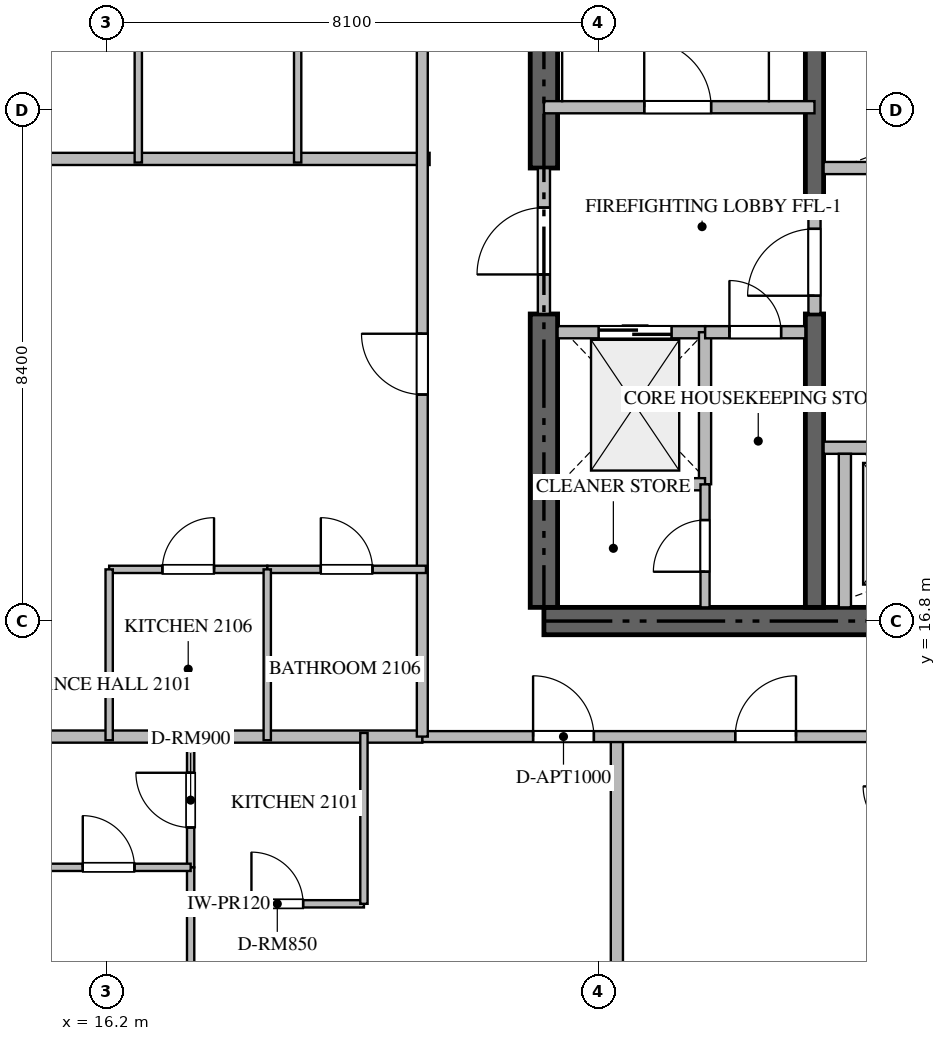
"""IFC4 building model, lengths in metres.
Left out: names, types, materials, properties, quantities, classifications, styles, units other than length and angle.
Written with IfcOpenShell. Run it as: python <this file> out.ifc"""

import sys

from ifc_helpers import new_model, si_unit, direction, frame, frame_2d, origin, place, context, subcontext, project, spatial, rectangle, extrude, source, transform, mapped, element, fill, save


model = new_model("IFC4")
c1 = context("Model", 3, precision=1e-05, world=origin(), true_north=direction((0.0, 1.0)))
c2 = subcontext(c1, "Body", "Model", "MODEL_VIEW")
j1 = project(units=[si_unit("LENGTHUNIT", "METRE"), si_unit("PLANEANGLEUNIT", "RADIAN")], contexts=[c1])
p1 = place(None, origin())
s1 = spatial("IfcSite", under=j1, at=p1, CompositionType="ELEMENT")
p2 = place(p1, origin())
s2 = spatial("IfcBuilding", under=s1, at=p2, CompositionType="ELEMENT")
p3 = place(p2, frame((0.0, 0.0, 86.7)))
s3 = spatial("IfcBuildingStorey", under=s2, at=p3, CompositionType="ELEMENT", Elevation=86.7)
p4 = place(p3, frame((23.4, 16.8, -0.26), z_axis=(0.0, 0.0, 1.0), x_axis=(1.0, 0.0, 0.0)))
e1 = element("IfcWall", 1, at=p4, inside=s3, PredefinedType="SHEAR", context=c2, shape_type="SweptSolid", body=[
    extrude(rectangle(XDim=18.0, YDim=0.45, at=frame_2d((9.0, 0.0))), origin(), (0.0, 0.0, 1.0), 3.748),
])
p5 = place(p3, frame((23.4, 17.025, -0.26), z_axis=(0.0, 0.0, 1.0), x_axis=(0.0, 1.0, 0.0)))
e2 = element("IfcWall", 2, at=p5, inside=s3, PredefinedType="SHEAR", context=c2, shape_type="SweptSolid", body=[
    extrude(rectangle(XDim=4.825, YDim=0.45, at=frame_2d((2.413, 0.0))), origin(), (0.0, 0.0, 1.0), 3.748),
])
p6 = place(p3, frame((23.4, 24.25, -0.26), z_axis=(0.0, 0.0, 1.0), x_axis=(0.0, 1.0, 0.0)))
e3 = element("IfcWall", 3, at=p6, inside=s3, PredefinedType="SHEAR", context=c2, shape_type="SweptSolid", body=[
    extrude(rectangle(XDim=9.125, YDim=0.45, at=frame_2d((4.562, 0.0))), origin(), (0.0, 0.0, 1.0), 3.748),
])
p7 = place(p3, frame((27.85, 17.025, -0.26), z_axis=(0.0, 0.0, 1.0), x_axis=(0.0, 1.0, 0.0)))
e4 = element("IfcWall", 4, at=p7, inside=s3, PredefinedType="SHEAR", context=c2, shape_type="SweptSolid", body=[
    extrude(rectangle(XDim=4.825, YDim=0.3, at=frame_2d((2.413, 0.0))), origin(), (0.0, 0.0, 1.0), 3.748),
])
p8 = place(p3, frame((27.85, 23.55, -0.26), z_axis=(0.0, 0.0, 1.0), x_axis=(0.0, 1.0, 0.0)))
e5 = element("IfcWall", 5, at=p8, inside=s3, PredefinedType="SHEAR", context=c2, shape_type="SweptSolid", body=[
    extrude(rectangle(XDim=9.825, YDim=0.3, at=frame_2d((4.913, 0.0))), origin(), (0.0, 0.0, 1.0), 3.748),
])
p9 = place(p3, frame((23.4, 25.25, 0.0), z_axis=(0.0, 0.0, 1.0), x_axis=(1.0, 0.0, 0.0)))
e6 = element("IfcWall", 6, at=p9, inside=s3, PredefinedType="STANDARD", context=c2, shape_type="SweptSolid", body=[
    extrude(rectangle(XDim=4.45, YDim=0.2, at=frame_2d((2.225, 0.0))), origin(), (0.0, 0.0, 1.0), 3.49),
])
p10 = place(p9, frame((1.65, 0.0, 0.0)))
e7 = element("IfcOpeningElement", 7, at=p10, cuts=e6, PredefinedType="OPENING", context=c2, shape_type="SweptSolid", body=[
    extrude(rectangle(XDim=1.1, YDim=2.15, at=frame_2d((0.55, 1.075))), frame((0.0, 0.11, 0.0), z_axis=(0.0, -1.0, 0.0), x_axis=(1.0, 0.0, 0.0)), (0.0, 0.0, 1.0), 0.22),
])
p11 = place(p3, frame((23.625, 21.55, 0.0), z_axis=(0.0, 0.0, 1.0), x_axis=(1.0, 0.0, 0.0)))
e8 = element("IfcWall", 8, at=p11, inside=s3, PredefinedType="STANDARD", context=c2, shape_type="SweptSolid", body=[
    extrude(rectangle(XDim=2.425, YDim=0.2, at=frame_2d((1.212, 0.0))), origin(), (0.0, 0.0, 1.0), 3.49),
])
p12 = place(p11, frame((0.675, 0.0, 0.0)))
e9 = element("IfcOpeningElement", 9, at=p12, cuts=e8, PredefinedType="OPENING", context=c2, shape_type="SweptSolid", body=[
    extrude(rectangle(XDim=1.2, YDim=2.2, at=frame_2d((0.6, 1.1))), frame((0.0, 0.11, 0.0), z_axis=(0.0, -1.0, 0.0), x_axis=(1.0, 0.0, 0.0)), (0.0, 0.0, 1.0), 0.22),
])
p13 = place(p3, frame((28.0, 19.65, 0.0), z_axis=(0.0, 0.0, 1.0), x_axis=(1.0, 0.0, 0.0)))
e10 = element("IfcWall", 10, at=p13, inside=s3, PredefinedType="STANDARD", context=c2, shape_type="SweptSolid", body=[
    extrude(rectangle(XDim=2.65, YDim=0.2, at=frame_2d((1.325, 0.0))), origin(), (0.0, 0.0, 1.0), 3.49),
])
p14 = place(p13, frame((0.9, 0.0, 0.0)))
e11 = element("IfcOpeningElement", 11, at=p14, cuts=e10, PredefinedType="OPENING", context=c2, shape_type="SweptSolid", body=[
    extrude(rectangle(XDim=1.1, YDim=2.2, at=frame_2d((0.55, 1.1))), frame((0.0, 0.11, 0.0), z_axis=(0.0, -1.0, 0.0), x_axis=(1.0, 0.0, 0.0)), (0.0, 0.0, 1.0), 0.22),
])
p15 = place(p3, frame((28.35, 17.025, 0.0), z_axis=(0.0, 0.0, 1.0), x_axis=(0.0, 1.0, 0.0)))
e12 = element("IfcWall", 12, at=p15, inside=s3, PredefinedType="STANDARD", context=c2, shape_type="SweptSolid", body=[
    extrude(rectangle(XDim=2.525, YDim=0.2, at=frame_2d((1.263, 0.0))), origin(), (0.0, 0.0, 1.0), 3.49),
])
p16 = place(p3, frame((28.0, 24.25, 0.0), z_axis=(0.0, 0.0, 1.0), x_axis=(1.0, 0.0, 0.0)))
e13 = element("IfcWall", 13, at=p16, inside=s3, PredefinedType="STANDARD", context=c2, shape_type="SweptSolid", body=[
    extrude(rectangle(XDim=2.425, YDim=0.2, at=frame_2d((1.212, 0.0))), origin(), (0.0, 0.0, 1.0), 3.49),
])
p17 = place(p3, frame((26.05, 19.05, 0.0), z_axis=(0.0, 0.0, 1.0), x_axis=(0.0, 1.0, 0.0)))
e14 = element("IfcWall", 14, at=p17, inside=s3, PredefinedType="STANDARD", context=c2, shape_type="SweptSolid", body=[
    extrude(rectangle(XDim=2.5, YDim=0.2, at=frame_2d((1.25, 0.0))), origin(), (0.0, 0.0, 1.0), 3.49),
])
p18 = place(p3, frame((23.625, 19.05, 0.0), z_axis=(0.0, 0.0, 1.0), x_axis=(1.0, 0.0, 0.0)))
e15 = element("IfcWall", 15, at=p18, inside=s3, PredefinedType="STANDARD", context=c2, shape_type="SweptSolid", body=[
    extrude(rectangle(XDim=2.425, YDim=0.2, at=frame_2d((1.212, 0.0))), origin(), (0.0, 0.0, 1.0), 3.49),
])
p19 = place(p3, frame((26.052, 21.55, 0.0), z_axis=(0.0, 0.0, 1.0), x_axis=(1.0, 0.0, 0.0)))
e16 = element("IfcWall", 16, at=p19, inside=s3, PredefinedType="STANDARD", context=c2, shape_type="SweptSolid", body=[
    extrude(rectangle(XDim=1.648, YDim=0.2, at=frame_2d((0.824, 0.0))), origin(), (0.0, 0.0, 1.0), 3.49),
])
p20 = place(p19, frame((0.399, 0.0, 0.0)))
e17 = element("IfcOpeningElement", 17, at=p20, cuts=e16, PredefinedType="OPENING", context=c2, shape_type="SweptSolid", body=[
    extrude(rectangle(XDim=0.85, YDim=2.1, at=frame_2d((0.425, 1.05))), frame((0.0, 0.11, 0.0), z_axis=(0.0, -1.0, 0.0), x_axis=(1.0, 0.0, 0.0)), (0.0, 0.0, 1.0), 0.22),
])
p21 = place(p3, frame((23.4, 21.852, 0.0), z_axis=(0.0, 0.0, 1.0), x_axis=(0.0, 1.0, 0.0)))
e18 = element("IfcWall", 18, at=p21, inside=s3, PredefinedType="STANDARD", context=c2, shape_type="SweptSolid", body=[
    extrude(rectangle(XDim=2.396, YDim=0.2, at=frame_2d((1.198, 0.0))), origin(), (0.0, 0.0, 1.0), 3.49),
])
p22 = place(p21, frame((0.648, 0.0, 0.0)))
e19 = element("IfcOpeningElement", 19, at=p22, cuts=e18, PredefinedType="OPENING", context=c2, shape_type="SweptSolid", body=[
    extrude(rectangle(XDim=1.1, YDim=2.15, at=frame_2d((0.55, 1.075))), frame((0.0, 0.11, 0.0), z_axis=(0.0, -1.0, 0.0), x_axis=(1.0, 0.0, 0.0)), (0.0, 0.0, 1.0), 0.22),
])
p23 = place(p3, frame((27.85, 21.852, 0.0), z_axis=(0.0, 0.0, 1.0), x_axis=(0.0, 1.0, 0.0)))
e20 = element("IfcWall", 20, at=p23, inside=s3, PredefinedType="STANDARD", context=c2, shape_type="SweptSolid", body=[
    extrude(rectangle(XDim=1.696, YDim=0.2, at=frame_2d((0.848, 0.0))), origin(), (0.0, 0.0, 1.0), 3.49),
])
p24 = place(p23, frame((0.298, 0.0, 0.0)))
e21 = element("IfcOpeningElement", 21, at=p24, cuts=e20, PredefinedType="OPENING", context=c2, shape_type="SweptSolid", body=[
    extrude(rectangle(XDim=1.1, YDim=2.15, at=frame_2d((0.55, 1.075))), frame((0.0, 0.11, 0.0), z_axis=(0.0, -1.0, 0.0), x_axis=(1.0, 0.0, 0.0)), (0.0, 0.0, 1.0), 0.22),
])
p25 = place(p3, frame((26.05, 17.025, 0.0), z_axis=(0.0, 0.0, 1.0), x_axis=(0.0, 1.0, 0.0)))
e22 = element("IfcWall", 22, at=p25, inside=s3, PredefinedType="PARTITIONING", context=c2, shape_type="SweptSolid", body=[
    extrude(rectangle(XDim=2.023, YDim=0.15, at=frame_2d((1.012, 0.0))), origin(), (0.0, 0.0, 1.0), 3.49),
])
p26 = place(p25, frame((0.586, 0.0, 0.0)))
e23 = element("IfcOpeningElement", 23, at=p26, cuts=e22, PredefinedType="OPENING", context=c2, shape_type="SweptSolid", body=[
    extrude(rectangle(XDim=0.85, YDim=2.1, at=frame_2d((0.425, 1.05))), frame((0.0, 0.085, 0.0), z_axis=(0.0, -1.0, 0.0), x_axis=(1.0, 0.0, 0.0)), (0.0, 0.0, 1.0), 0.17),
])
p27 = place(p3, frame((24.6, 0.282, 0.0), z_axis=(0.0, 0.0, 1.0), x_axis=(0.0, 1.0, 0.0)))
e24 = element("IfcWall", 24, at=p27, inside=s3, PredefinedType="PARTITIONING", context=c2, shape_type="SweptSolid", body=[
    extrude(rectangle(XDim=14.618, YDim=0.2, at=frame_2d((7.309, 0.0))), origin(), (0.0, 0.0, 1.0), 3.49),
])
p28 = place(p3, frame((6.082, 24.4, 0.0), z_axis=(0.0, 0.0, 1.0), x_axis=(1.0, 0.0, 0.0)))
e25 = element("IfcWall", 25, at=p28, inside=s3, PredefinedType="PARTITIONING", context=c2, shape_type="SweptSolid", body=[
    extrude(rectangle(XDim=15.438, YDim=0.2, at=frame_2d((7.719, 0.0))), origin(), (0.0, 0.0, 1.0), 3.49),
])
p29 = place(p3, frame((6.082, 14.9, 0.0), z_axis=(0.0, 0.0, 1.0), x_axis=(1.0, 0.0, 0.0)))
e26 = element("IfcWall", 26, at=p29, inside=s3, PredefinedType="PARTITIONING", context=c2, shape_type="SweptSolid", body=[
    extrude(rectangle(XDim=15.318, YDim=0.2, at=frame_2d((7.659, 0.0))), origin(), (0.0, 0.0, 1.0), 3.49),
])
p30 = place(p3, frame((21.402, 14.9, 0.0), z_axis=(0.0, 0.0, 1.0), x_axis=(1.0, 0.0, 0.0)))
e27 = element("IfcWall", 27, at=p30, inside=s3, PredefinedType="PARTITIONING", context=c2, shape_type="SweptSolid", body=[
    extrude(rectangle(XDim=21.996, YDim=0.18, at=frame_2d((10.998, 0.0))), origin(), (0.0, 0.0, 1.0), 3.49),
])
p31 = place(p30, frame((1.82, 0.0, 0.0)))
e28 = element("IfcOpeningElement", 28, at=p31, cuts=e27, PredefinedType="OPENING", context=c2, shape_type="SweptSolid", body=[
    extrude(rectangle(XDim=1.0, YDim=2.15, at=frame_2d((0.5, 1.075))), frame((0.0, 0.1, 0.0), z_axis=(0.0, -1.0, 0.0), x_axis=(1.0, 0.0, 0.0)), (0.0, 0.0, 1.0), 0.2),
])
p32 = place(p30, frame((5.144, 0.0, 0.0)))
e29 = element("IfcOpeningElement", 29, at=p32, cuts=e27, PredefinedType="OPENING", context=c2, shape_type="SweptSolid", body=[
    extrude(rectangle(XDim=1.0, YDim=2.15, at=frame_2d((0.5, 1.075))), frame((0.0, 0.1, 0.0), z_axis=(0.0, -1.0, 0.0), x_axis=(1.0, 0.0, 0.0)), (0.0, 0.0, 1.0), 0.2),
])
p33 = place(p30, frame((11.758, 0.0, 0.0)))
e30 = element("IfcOpeningElement", 30, at=p33, cuts=e27, PredefinedType="OPENING", context=c2, shape_type="SweptSolid", body=[
    extrude(rectangle(XDim=1.0, YDim=2.15, at=frame_2d((0.5, 1.075))), frame((0.0, 0.1, 0.0), z_axis=(0.0, -1.0, 0.0), x_axis=(1.0, 0.0, 0.0)), (0.0, 0.0, 1.0), 0.2),
])
p34 = place(p30, frame((18.896, 0.0, 0.0)))
e31 = element("IfcOpeningElement", 31, at=p34, cuts=e27, PredefinedType="OPENING", context=c2, shape_type="SweptSolid", body=[
    extrude(rectangle(XDim=1.0, YDim=2.15, at=frame_2d((0.5, 1.075))), frame((0.0, 0.1, 0.0), z_axis=(0.0, -1.0, 0.0), x_axis=(1.0, 0.0, 0.0)), (0.0, 0.0, 1.0), 0.2),
])
p35 = place(p3, frame((21.4, 14.9, 0.0), z_axis=(0.0, 0.0, 1.0), x_axis=(0.0, 1.0, 0.0)))
e32 = element("IfcWall", 32, at=p35, inside=s3, PredefinedType="PARTITIONING", context=c2, shape_type="SweptSolid", body=[
    extrude(rectangle(XDim=20.6, YDim=0.18, at=frame_2d((10.3, 0.0))), origin(), (0.0, 0.0, 1.0), 3.49),
])
p36 = place(p35, frame((5.625, 0.0, 0.0)))
e33 = element("IfcOpeningElement", 33, at=p36, cuts=e32, PredefinedType="OPENING", context=c2, shape_type="SweptSolid", body=[
    extrude(rectangle(XDim=1.0, YDim=2.15, at=frame_2d((0.5, 1.075))), frame((0.0, 0.1, 0.0), z_axis=(0.0, -1.0, 0.0), x_axis=(1.0, 0.0, 0.0)), (0.0, 0.0, 1.0), 0.2),
])
p37 = place(p35, frame((17.64, 0.0, 0.0)))
e34 = element("IfcOpeningElement", 34, at=p37, cuts=e32, PredefinedType="OPENING", context=c2, shape_type="SweptSolid", body=[
    extrude(rectangle(XDim=1.0, YDim=2.15, at=frame_2d((0.5, 1.075))), frame((0.0, 0.1, 0.0), z_axis=(0.0, -1.0, 0.0), x_axis=(1.0, 0.0, 0.0)), (0.0, 0.0, 1.0), 0.2),
])
p38 = place(p3, frame((17.59, 12.15, 0.0), z_axis=(0.0, 0.0, 1.0), x_axis=(1.0, 0.0, 0.0)))
e35 = element("IfcWall", 35, at=p38, inside=s3, PredefinedType="PARTITIONING", context=c2, shape_type="SweptSolid", body=[
    extrude(rectangle(XDim=2.85, YDim=0.12, at=frame_2d((1.425, 0.0))), origin(), (0.0, 0.0, 1.0), 3.49),
])
p39 = place(p38, frame((1.0, 0.0, 0.0)))
e36 = element("IfcOpeningElement", 36, at=p39, cuts=e35, PredefinedType="OPENING", context=c2, shape_type="SweptSolid", body=[
    extrude(rectangle(XDim=0.85, YDim=2.1, at=frame_2d((0.425, 1.05))), frame((0.0, 0.07, 0.0), z_axis=(0.0, -1.0, 0.0), x_axis=(1.0, 0.0, 0.0)), (0.0, 0.0, 1.0), 0.14),
])
p40 = place(p3, frame((20.44, 12.15, 0.0), z_axis=(0.0, 0.0, 1.0), x_axis=(0.0, 1.0, 0.0)))
e37 = element("IfcWall", 37, at=p40, inside=s3, PredefinedType="PARTITIONING", context=c2, shape_type="SweptSolid", body=[
    extrude(rectangle(XDim=2.81, YDim=0.12, at=frame_2d((1.405, 0.0))), origin(), (0.0, 0.0, 1.0), 3.49),
])
p41 = place(p3, frame((17.59, 12.75, 0.0), z_axis=(0.0, 0.0, 1.0), x_axis=(0.0, 1.0, 0.0)))
e38 = element("IfcWall", 38, at=p41, inside=s3, PredefinedType="PARTITIONING", context=c2, shape_type="SweptSolid", body=[
    extrude(rectangle(XDim=2.21, YDim=0.12, at=frame_2d((1.105, 0.0))), origin(), (0.0, 0.0, 1.0), 3.49),
])
p42 = place(p41, frame((0.655, 0.0, 0.0)))
e39 = element("IfcOpeningElement", 39, at=p42, cuts=e38, PredefinedType="OPENING", context=c2, shape_type="SweptSolid", body=[
    extrude(rectangle(XDim=0.9, YDim=2.1, at=frame_2d((0.45, 1.05))), frame((0.0, 0.07, 0.0), z_axis=(0.0, -1.0, 0.0), x_axis=(1.0, 0.0, 0.0)), (0.0, 0.0, 1.0), 0.14),
])
p43 = place(p3, frame((17.59, 8.883, 0.0), z_axis=(0.0, 0.0, 1.0), x_axis=(0.0, 1.0, 0.0)))
e40 = element("IfcWall", 40, at=p43, inside=s3, PredefinedType="PARTITIONING", context=c2, shape_type="SweptSolid", body=[
    extrude(rectangle(XDim=3.865, YDim=0.12, at=frame_2d((1.933, 0.0))), origin(), (0.0, 0.0, 1.0), 3.49),
])
p44 = place(p3, frame((14.892, 12.75, 0.0), z_axis=(0.0, 0.0, 1.0), x_axis=(1.0, 0.0, 0.0)))
e41 = element("IfcWall", 41, at=p44, inside=s3, PredefinedType="PARTITIONING", context=c2, shape_type="SweptSolid", body=[
    extrude(rectangle(XDim=2.698, YDim=0.12, at=frame_2d((1.349, 0.0))), origin(), (0.0, 0.0, 1.0), 3.49),
])
p45 = place(p44, frame((0.924, 0.0, 0.0)))
e42 = element("IfcOpeningElement", 42, at=p45, cuts=e41, PredefinedType="OPENING", context=c2, shape_type="SweptSolid", body=[
    extrude(rectangle(XDim=0.85, YDim=2.1, at=frame_2d((0.425, 1.05))), frame((0.0, 0.07, 0.0), z_axis=(0.0, -1.0, 0.0), x_axis=(1.0, 0.0, 0.0)), (0.0, 0.0, 1.0), 0.14),
])
p46 = place(p3, frame((16.25, 17.65, 0.0), z_axis=(0.0, 0.0, 1.0), x_axis=(1.0, 0.0, 0.0)))
e43 = element("IfcWall", 43, at=p46, inside=s3, PredefinedType="PARTITIONING", context=c2, shape_type="SweptSolid", body=[
    extrude(rectangle(XDim=2.6, YDim=0.12, at=frame_2d((1.3, 0.0))), origin(), (0.0, 0.0, 1.0), 3.49),
])
p47 = place(p46, frame((0.875, 0.0, 0.0)))
e44 = element("IfcOpeningElement", 44, at=p47, cuts=e43, PredefinedType="OPENING", context=c2, shape_type="SweptSolid", body=[
    extrude(rectangle(XDim=0.85, YDim=2.1, at=frame_2d((0.425, 1.05))), frame((0.0, 0.07, 0.0), z_axis=(0.0, -1.0, 0.0), x_axis=(1.0, 0.0, 0.0)), (0.0, 0.0, 1.0), 0.14),
])
p48 = place(p3, frame((18.852, 17.65, 0.0), z_axis=(0.0, 0.0, 1.0), x_axis=(1.0, 0.0, 0.0)))
e45 = element("IfcWall", 45, at=p48, inside=s3, PredefinedType="PARTITIONING", context=c2, shape_type="SweptSolid", body=[
    extrude(rectangle(XDim=2.608, YDim=0.12, at=frame_2d((1.304, 0.0))), origin(), (0.0, 0.0, 1.0), 3.49),
])
p49 = place(p48, frame((0.879, 0.0, 0.0)))
e46 = element("IfcOpeningElement", 46, at=p49, cuts=e45, PredefinedType="OPENING", context=c2, shape_type="SweptSolid", body=[
    extrude(rectangle(XDim=0.85, YDim=2.1, at=frame_2d((0.425, 1.05))), frame((0.0, 0.07, 0.0), z_axis=(0.0, -1.0, 0.0), x_axis=(1.0, 0.0, 0.0)), (0.0, 0.0, 1.0), 0.14),
])
for number, where, z_axis, x_axis in (
    (47, (18.85, 14.84, 0.0), (0.0, 0.0, 1.0), (0.0, 1.0, 0.0)),
    (48, (16.25, 14.84, 0.0), (0.0, 0.0, 1.0), (0.0, 1.0, 0.0)),
):
    element("IfcWall", number, at=place(p3, frame(where, z_axis=z_axis, x_axis=x_axis)), inside=s3, PredefinedType="PARTITIONING", context=c2, shape_type="SweptSolid", body=[
        extrude(rectangle(XDim=2.81, YDim=0.12, at=frame_2d((1.405, 0.0))), origin(), (0.0, 0.0, 1.0), 3.49),
    ])
for number, where, z_axis, x_axis in (
    (49, (16.729, 24.34, 0.0), (0.0, 0.0, 1.0), (0.0, 1.0, 0.0)),
    (50, (19.35, 24.34, 0.0), (0.0, 0.0, 1.0), (0.0, 1.0, 0.0)),
):
    element("IfcWall", number, at=place(p3, frame(where, z_axis=z_axis, x_axis=x_axis)), inside=s3, PredefinedType="PARTITIONING", context=c2, shape_type="SweptSolid", body=[
        extrude(rectangle(XDim=6.66, YDim=0.12, at=frame_2d((3.33, 0.0))), origin(), (0.0, 0.0, 1.0), 3.49),
    ])
m1 = source(origin(), c2, "Body", "SweptSolid", [
    extrude(rectangle(XDim=1.1, YDim=2.15, at=frame_2d((0.55, 1.075))), frame((0.0, 0.025, 0.0), z_axis=(0.0, -1.0, 0.0), x_axis=(1.0, 0.0, 0.0)), (0.0, 0.0, 1.0), 0.05),
])
p50 = place(p10, origin())
e51 = element("IfcDoor", 51, at=p50, inside=s3, OperationType="SINGLE_SWING_LEFT", PredefinedType="DOOR", context=c2, shape_type="MappedRepresentation", body=[
    mapped(m1, transform((0.0, 0.0, 0.0), scale=1.0)),
])
fill(e7, e51)
m2 = source(origin(), c2, "Body", "SweptSolid", [
    extrude(rectangle(XDim=1.2, YDim=2.2, at=frame_2d((0.6, 1.1))), frame((0.0, 0.025, 0.0), z_axis=(0.0, -1.0, 0.0), x_axis=(1.0, 0.0, 0.0)), (0.0, 0.0, 1.0), 0.05),
])
p51 = place(p12, origin())
e52 = element("IfcDoor", 52, at=p51, inside=s3, OperationType="DOUBLE_DOOR_SLIDING", PredefinedType="DOOR", context=c2, shape_type="MappedRepresentation", body=[
    mapped(m2, transform((0.0, 0.0, 0.0), scale=1.0)),
])
fill(e9, e52)
m3 = source(origin(), c2, "Body", "SweptSolid", [
    extrude(rectangle(XDim=0.85, YDim=2.1, at=frame_2d((0.425, 1.05))), frame((0.0, 0.025, 0.0), z_axis=(0.0, -1.0, 0.0), x_axis=(1.0, 0.0, 0.0)), (0.0, 0.0, 1.0), 0.05),
])
p52 = place(p20, origin())
e53 = element("IfcDoor", 53, at=p52, inside=s3, OperationType="SINGLE_SWING_LEFT", PredefinedType="DOOR", context=c2, shape_type="MappedRepresentation", body=[
    mapped(m3, transform((0.0, 0.0, 0.0), scale=1.0)),
])
fill(e17, e53)
p53 = place(p22, origin())
e54 = element("IfcDoor", 54, at=p53, inside=s3, OperationType="SINGLE_SWING_LEFT", PredefinedType="DOOR", context=c2, shape_type="MappedRepresentation", body=[
    mapped(m1, transform((0.0, 0.0, 0.0), scale=1.0)),
])
fill(e19, e54)
p54 = place(p24, origin())
e55 = element("IfcDoor", 55, at=p54, inside=s3, OperationType="SINGLE_SWING_LEFT", PredefinedType="DOOR", context=c2, shape_type="MappedRepresentation", body=[
    mapped(m1, transform((0.0, 0.0, 0.0), scale=1.0)),
])
fill(e21, e55)
p55 = place(p26, origin())
e56 = element("IfcDoor", 56, at=p55, inside=s3, OperationType="SINGLE_SWING_LEFT", PredefinedType="DOOR", context=c2, shape_type="MappedRepresentation", body=[
    mapped(m3, transform((0.0, 0.0, 0.0), scale=1.0)),
])
fill(e23, e56)
m4 = source(origin(), c2, "Body", "SweptSolid", [
    extrude(rectangle(XDim=1.0, YDim=2.15, at=frame_2d((0.5, 1.075))), frame((0.0, 0.025, 0.0), z_axis=(0.0, -1.0, 0.0), x_axis=(1.0, 0.0, 0.0)), (0.0, 0.0, 1.0), 0.05),
])
p56 = place(p31, origin())
e57 = element("IfcDoor", 57, at=p56, inside=s3, OperationType="SINGLE_SWING_LEFT", PredefinedType="DOOR", context=c2, shape_type="MappedRepresentation", body=[
    mapped(m4, transform((0.0, 0.0, 0.0), scale=1.0)),
])
fill(e28, e57)
p57 = place(p32, origin())
e58 = element("IfcDoor", 58, at=p57, inside=s3, OperationType="SINGLE_SWING_RIGHT", PredefinedType="DOOR", context=c2, shape_type="MappedRepresentation", body=[
    mapped(m4, transform((0.0, 0.0, 0.0), scale=1.0)),
])
fill(e29, e58)
p58 = place(p36, origin())
e59 = element("IfcDoor", 59, at=p58, inside=s3, OperationType="SINGLE_SWING_RIGHT", PredefinedType="DOOR", context=c2, shape_type="MappedRepresentation", body=[
    mapped(m4, transform((0.0, 0.0, 0.0), scale=1.0)),
])
fill(e33, e59)
p59 = place(p39, origin())
e60 = element("IfcDoor", 60, at=p59, inside=s3, OperationType="SINGLE_SWING_LEFT", PredefinedType="DOOR", context=c2, shape_type="MappedRepresentation", body=[
    mapped(m3, transform((0.0, 0.0, 0.0), scale=1.0)),
])
fill(e36, e60)
m5 = source(origin(), c2, "Body", "SweptSolid", [
    extrude(rectangle(XDim=0.9, YDim=2.1, at=frame_2d((0.45, 1.05))), frame((0.0, 0.025, 0.0), z_axis=(0.0, -1.0, 0.0), x_axis=(1.0, 0.0, 0.0)), (0.0, 0.0, 1.0), 0.05),
])
p60 = place(p42, origin())
e61 = element("IfcDoor", 61, at=p60, inside=s3, OperationType="SINGLE_SWING_RIGHT", PredefinedType="DOOR", context=c2, shape_type="MappedRepresentation", body=[
    mapped(m5, transform((0.0, 0.0, 0.0), scale=1.0)),
])
fill(e39, e61)
p61 = place(p45, origin())
e62 = element("IfcDoor", 62, at=p61, inside=s3, OperationType="SINGLE_SWING_LEFT", PredefinedType="DOOR", context=c2, shape_type="MappedRepresentation", body=[
    mapped(m3, transform((0.0, 0.0, 0.0), scale=1.0)),
])
fill(e42, e62)
p62 = place(p47, origin())
e63 = element("IfcDoor", 63, at=p62, inside=s3, OperationType="SINGLE_SWING_RIGHT", PredefinedType="DOOR", context=c2, shape_type="MappedRepresentation", body=[
    mapped(m3, transform((0.0, 0.0, 0.0), scale=1.0)),
])
fill(e44, e63)
p63 = place(p49, origin())
e64 = element("IfcDoor", 64, at=p63, inside=s3, OperationType="SINGLE_SWING_LEFT", PredefinedType="DOOR", context=c2, shape_type="MappedRepresentation", body=[
    mapped(m3, transform((0.0, 0.0, 0.0), scale=1.0)),
])
fill(e46, e64)
save(model, sys.argv[1])
